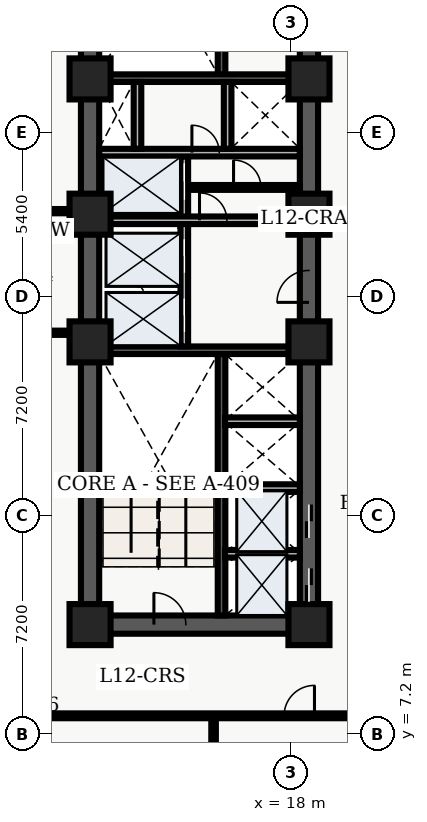
"""IFC4 building model, lengths in metres.
Left out: names, types, materials, properties, quantities, classifications, styles, units other than length and angle.
Written with IfcOpenShell. Run it as: python <this file> out.ifc"""

import sys

from ifc_helpers import new_model, entity, si_unit, converted_unit, direction, frame, origin_with_axes, origin_2d_with_axis, place, context, subcontext, project, spatial, polyline, rectangle, outline, extrude, element, fill, save


model = new_model("IFC4")
c1 = context("Model", 3, precision=1e-05, world=origin_with_axes(), true_north=direction((0.0, 1.0)))
c2 = subcontext(c1, "Body", "Model", "MODEL_VIEW")
j1 = project(units=[si_unit("LENGTHUNIT", "METRE"), converted_unit("PLANEANGLEUNIT", "DEGREE", entity("IfcPlaneAngleMeasure", 0.017), si_unit("PLANEANGLEUNIT", "RADIAN"), dimensions=[0, 0, 0, 0, 0, 0, 0])], contexts=[c1])
p1 = place(None, origin_with_axes())
s1 = spatial("IfcSite", under=j1, at=p1, CompositionType="ELEMENT")
p2 = place(p1, origin_with_axes())
s2 = spatial("IfcBuilding", under=s1, at=p2, CompositionType="ELEMENT")
p3 = place(p2, frame((0.0, 0.0, 52.2), z_axis=(0.0, 0.0, 1.0), x_axis=(1.0, 0.0, 0.0)))
s3 = spatial("IfcBuildingStorey", under=s2, at=p3, CompositionType="ELEMENT", Elevation=52.2)
p4 = place(p3, frame((11.4, 10.8, 0.0), z_axis=(0.0, 0.0, 1.0), x_axis=(0.0, 1.0, 0.0)))
e1 = element("IfcWall", 1, at=p4, inside=s3, PredefinedType="SHEAR", context=c2, shape_type="SweptSolid", body=[
    extrude(outline(polyline([(0.0, -0.3), (27.0, -0.3), (27.0, 0.3), (0.0, 0.3), (0.0, -0.3)])), origin_with_axes(), (0.0, 0.0, 1.0), 3.66),
])
p5 = place(p3, frame((11.4, 10.8, 0.0), z_axis=(0.0, 0.0, 1.0), x_axis=(1.0, 0.0, 0.0)))
e2 = element("IfcWall", 2, at=p5, inside=s3, PredefinedType="SHEAR", context=c2, shape_type="SweptSolid", body=[
    extrude(outline(polyline([(0.0, -0.3), (7.2, -0.3), (7.2, 0.3), (0.0, 0.3), (0.0, -0.3)])), origin_with_axes(), (0.0, 0.0, 1.0), 3.66),
])
p6 = place(p5, frame((2.625, 0.0, 0.0), z_axis=(0.0, 0.0, 1.0), x_axis=(1.0, 0.0, 0.0)))
e3 = element("IfcOpeningElement", 3, at=p6, cuts=e2, PredefinedType="OPENING", context=c2, shape_type="SweptSolid", body=[
    extrude(rectangle(XDim=1.05, YDim=0.62, at=origin_2d_with_axis()), origin_with_axes(), (0.0, 0.0, 1.0), 2.15),
])
p7 = place(p3, frame((18.6, 10.8, 0.0), z_axis=(0.0, 0.0, 1.0), x_axis=(0.0, 1.0, 0.0)))
e4 = element("IfcWall", 4, at=p7, inside=s3, PredefinedType="SHEAR", context=c2, shape_type="SweptSolid", body=[
    extrude(outline(polyline([(0.0, -0.3), (13.5, -0.3), (13.5, 0.3), (0.0, 0.3), (0.0, -0.3)])), origin_with_axes(), (0.0, 0.0, 1.0), 3.66),
])
p8 = place(p7, frame((1.3, 0.0, 0.0), z_axis=(0.0, 0.0, 1.0), x_axis=(1.0, 0.0, 0.0)))
e5 = element("IfcOpeningElement", 5, at=p8, cuts=e4, PredefinedType="OPENING", context=c2, shape_type="SweptSolid", body=[
    extrude(rectangle(XDim=1.1, YDim=0.62, at=origin_2d_with_axis()), origin_with_axes(), (0.0, 0.0, 1.0), 2.15),
])
p9 = place(p7, frame((3.4, 0.0, 0.0), z_axis=(0.0, 0.0, 1.0), x_axis=(1.0, 0.0, 0.0)))
e6 = element("IfcOpeningElement", 6, at=p9, cuts=e4, PredefinedType="OPENING", context=c2, shape_type="SweptSolid", body=[
    extrude(rectangle(XDim=1.1, YDim=0.62, at=origin_2d_with_axis()), origin_with_axes(), (0.0, 0.0, 1.0), 2.15),
])
p10 = place(p7, frame((11.125, 0.0, 0.0), z_axis=(0.0, 0.0, 1.0), x_axis=(1.0, 0.0, 0.0)))
e7 = element("IfcOpeningElement", 7, at=p10, cuts=e4, PredefinedType="OPENING", context=c2, shape_type="SweptSolid", body=[
    extrude(rectangle(XDim=1.05, YDim=0.62, at=origin_2d_with_axis()), origin_with_axes(), (0.0, 0.0, 1.0), 2.15),
])
p11 = place(p3, frame((18.6, 24.3, 0.0), z_axis=(0.0, 0.0, 1.0), x_axis=(0.0, 1.0, 0.0)))
e8 = element("IfcWall", 8, at=p11, inside=s3, PredefinedType="SHEAR", context=c2, shape_type="SweptSolid", body=[
    extrude(outline(polyline([(0.0, -0.3), (13.5, -0.3), (13.5, 0.3), (0.0, 0.3), (0.0, -0.3)])), origin_with_axes(), (0.0, 0.0, 1.0), 3.66),
])
p12 = place(p11, frame((6.725, 0.0, 0.0), z_axis=(0.0, 0.0, 1.0), x_axis=(1.0, 0.0, 0.0)))
e9 = element("IfcOpeningElement", 9, at=p12, cuts=e8, PredefinedType="OPENING", context=c2, shape_type="SweptSolid", body=[
    extrude(rectangle(XDim=1.05, YDim=0.62, at=origin_2d_with_axis()), origin_with_axes(), (0.0, 0.0, 1.0), 2.15),
])
p13 = place(p3, frame((15.725, 11.1, 0.0), z_axis=(0.0, 0.0, 1.0), x_axis=(0.0, 1.0, 0.0)))
e10 = element("IfcWall", 10, at=p13, inside=s3, PredefinedType="SHEAR", context=c2, shape_type="SweptSolid", body=[
    extrude(outline(polyline([(0.0, -0.125), (8.6, -0.125), (8.6, 0.125), (0.0, 0.125), (0.0, -0.125)])), origin_with_axes(), (0.0, 0.0, 1.0), 3.66),
])
p14 = place(p3, frame((11.7, 19.825, 0.0), z_axis=(0.0, 0.0, 1.0), x_axis=(1.0, 0.0, 0.0)))
e11 = element("IfcWall", 11, at=p14, inside=s3, PredefinedType="SHEAR", context=c2, shape_type="SweptSolid", body=[
    extrude(outline(polyline([(0.0, -0.125), (6.6, -0.125), (6.6, 0.125), (0.0, 0.125), (0.0, -0.125)])), origin_with_axes(), (0.0, 0.0, 1.0), 3.66),
])
p15 = place(p3, frame((15.725, 28.9, 0.0), z_axis=(0.0, 0.0, 1.0), x_axis=(0.0, 1.0, 0.0)))
e12 = element("IfcWall", 12, at=p15, inside=s3, PredefinedType="SHEAR", context=c2, shape_type="SweptSolid", body=[
    extrude(outline(polyline([(0.0, -0.125), (8.6, -0.125), (8.6, 0.125), (0.0, 0.125), (0.0, -0.125)])), origin_with_axes(), (0.0, 0.0, 1.0), 3.66),
])
p16 = place(p3, frame((11.7, 28.775, 0.0), z_axis=(0.0, 0.0, 1.0), x_axis=(1.0, 0.0, 0.0)))
e13 = element("IfcWall", 13, at=p16, inside=s3, PredefinedType="SHEAR", context=c2, shape_type="SweptSolid", body=[
    extrude(outline(polyline([(0.0, -0.125), (6.6, -0.125), (6.6, 0.125), (0.0, 0.125), (0.0, -0.125)])), origin_with_axes(), (0.0, 0.0, 1.0), 3.66),
])
p17 = place(p3, frame((14.5, 19.95, 0.0), z_axis=(0.0, 0.0, 1.0), x_axis=(0.0, 1.0, 0.0)))
e14 = element("IfcWall", 14, at=p17, inside=s3, PredefinedType="SOLIDWALL", context=c2, shape_type="SweptSolid", body=[
    extrude(outline(polyline([(0.0, -0.125), (6.25, -0.125), (6.25, 0.125), (0.0, 0.125), (0.0, -0.125)])), origin_with_axes(), (0.0, 0.0, 1.0), 2.7),
])
p18 = place(p17, frame((1.025, 0.0, 0.0), z_axis=(0.0, 0.0, 1.0), x_axis=(1.0, 0.0, 0.0)))
e15 = element("IfcOpeningElement", 15, at=p18, cuts=e14, PredefinedType="OPENING", context=c2, shape_type="SweptSolid", body=[
    extrude(rectangle(XDim=1.1, YDim=0.27, at=origin_2d_with_axis()), origin_with_axes(), (0.0, 0.0, 1.0), 2.15),
])
p19 = place(p17, frame((2.975, 0.0, 0.0), z_axis=(0.0, 0.0, 1.0), x_axis=(1.0, 0.0, 0.0)))
e16 = element("IfcOpeningElement", 16, at=p19, cuts=e14, PredefinedType="OPENING", context=c2, shape_type="SweptSolid", body=[
    extrude(rectangle(XDim=1.1, YDim=0.27, at=origin_2d_with_axis()), origin_with_axes(), (0.0, 0.0, 1.0), 2.15),
])
p20 = place(p17, frame((5.425, 0.0, 0.0), z_axis=(0.0, 0.0, 1.0), x_axis=(1.0, 0.0, 0.0)))
e17 = element("IfcOpeningElement", 17, at=p20, cuts=e14, PredefinedType="OPENING", context=c2, shape_type="SweptSolid", body=[
    extrude(rectangle(XDim=1.2, YDim=0.27, at=origin_2d_with_axis()), origin_with_axes(), (0.0, 0.0, 1.0), 2.15),
])
p21 = place(p3, frame((11.7, 24.1, 0.0), z_axis=(0.0, 0.0, 1.0), x_axis=(1.0, 0.0, 0.0)))
e18 = element("IfcWall", 18, at=p21, inside=s3, PredefinedType="SOLIDWALL", context=c2, shape_type="SweptSolid", body=[
    extrude(outline(polyline([(0.0, -0.125), (6.6, -0.125), (6.6, 0.125), (0.0, 0.125), (0.0, -0.125)])), origin_with_axes(), (0.0, 0.0, 1.0), 2.7),
])
p22 = place(p21, frame((3.75, 0.0, 0.0), z_axis=(0.0, 0.0, 1.0), x_axis=(1.0, 0.0, 0.0)))
e19 = element("IfcOpeningElement", 19, at=p22, cuts=e18, PredefinedType="OPENING", context=c2, shape_type="SweptSolid", body=[
    extrude(rectangle(XDim=0.9, YDim=0.27, at=origin_2d_with_axis()), origin_with_axes(), (0.0, 0.0, 1.0), 2.15),
])
p23 = place(p3, frame((11.7, 26.325, 0.0), z_axis=(0.0, 0.0, 1.0), x_axis=(1.0, 0.0, 0.0)))
e20 = element("IfcWall", 20, at=p23, inside=s3, PredefinedType="SOLIDWALL", context=c2, shape_type="SweptSolid", body=[
    extrude(outline(polyline([(0.0, -0.125), (6.6, -0.125), (6.6, 0.125), (0.0, 0.125), (0.0, -0.125)])), origin_with_axes(), (0.0, 0.0, 1.0), 2.7),
])
p24 = place(p23, frame((3.5, 0.0, 0.0), z_axis=(0.0, 0.0, 1.0), x_axis=(1.0, 0.0, 0.0)))
e21 = element("IfcOpeningElement", 21, at=p24, cuts=e20, PredefinedType="OPENING", context=c2, shape_type="SweptSolid", body=[
    extrude(rectangle(XDim=0.9, YDim=0.27, at=origin_2d_with_axis()), origin_with_axes(), (0.0, 0.0, 1.0), 2.15),
])
for number, where, z_axis, x_axis in (
    (22, (12.96, 26.45, 0.0), (0.0, 0.0, 1.0), (0.0, 1.0, 0.0)),
    (23, (15.925, 26.45, 0.0), (0.0, 0.0, 1.0), (0.0, 1.0, 0.0)),
):
    element("IfcWall", number, at=place(p3, frame(where, z_axis=z_axis, x_axis=x_axis)), inside=s3, PredefinedType="SOLIDWALL", context=c2, shape_type="SweptSolid", body=[
        extrude(outline(polyline([(0.0, -0.125), (2.2, -0.125), (2.2, 0.125), (0.0, 0.125), (0.0, -0.125)])), origin_with_axes(), (0.0, 0.0, 1.0), 2.7),
    ])
for number, where, z_axis, x_axis in (
    (24, (11.4, 10.8, 0.0), (0.0, 0.0, 1.0), (1.0, 0.0, 0.0)),
    (25, (11.4, 20.1, 0.0), (0.0, 0.0, 1.0), (1.0, 0.0, 0.0)),
    (26, (11.4, 24.3, 0.0), (0.0, 0.0, 1.0), (1.0, 0.0, 0.0)),
    (27, (11.4, 28.75, 0.0), (0.0, 0.0, 1.0), (1.0, 0.0, 0.0)),
    (28, (18.6, 10.8, 0.0), (0.0, 0.0, 1.0), (1.0, 0.0, 0.0)),
    (29, (18.6, 20.1, 0.0), (0.0, 0.0, 1.0), (1.0, 0.0, 0.0)),
    (30, (18.6, 24.3, 0.0), (0.0, 0.0, 1.0), (1.0, 0.0, 0.0)),
    (31, (18.6, 28.75, 0.0), (0.0, 0.0, 1.0), (1.0, 0.0, 0.0)),
):
    element("IfcColumn", number, at=place(p3, frame(where, z_axis=z_axis, x_axis=x_axis)), inside=s3, PredefinedType="COLUMN", context=c2, shape_type="SweptSolid", body=[
        extrude(rectangle(XDim=1.35, YDim=1.35, at=origin_2d_with_axis()), origin_with_axes(), (0.0, 0.0, 1.0), 3.9),
    ])
p25 = place(p3, frame((14.62, 25.18, 0.0), z_axis=(0.0, 0.0, 1.0), x_axis=(1.0, 0.0, 0.0)))
e32 = element("IfcWall", 32, at=p25, inside=s3, PredefinedType="PARTITIONING", context=c2, shape_type="SweptSolid", body=[
    extrude(outline(polyline([(0.0, -0.08), (3.68, -0.08), (3.68, 0.08), (0.0, 0.08), (0.0, -0.08)])), origin_with_axes(), (0.0, 0.0, 1.0), 2.7),
])
p26 = place(p25, frame((1.95, 0.0, 0.0), z_axis=(0.0, 0.0, 1.0), x_axis=(1.0, 0.0, 0.0)))
e33 = element("IfcOpeningElement", 33, at=p26, cuts=e32, PredefinedType="OPENING", context=c2, shape_type="SweptSolid", body=[
    extrude(rectangle(XDim=0.9, YDim=0.18, at=origin_2d_with_axis()), origin_with_axes(), (0.0, 0.0, 1.0), 2.15),
])
for number, where, z_axis, x_axis in (
    (34, (15.84, 13.13, 0.0), (0.0, 0.0, 1.0), (1.0, 0.0, 0.0)),
    (35, (15.84, 15.29, 0.0), (0.0, 0.0, 1.0), (1.0, 0.0, 0.0)),
    (36, (15.84, 17.49, 0.0), (0.0, 0.0, 1.0), (1.0, 0.0, 0.0)),
):
    element("IfcWall", number, at=place(p3, frame(where, z_axis=z_axis, x_axis=x_axis)), inside=s3, PredefinedType="SOLIDWALL", context=c2, shape_type="SweptSolid", body=[
        extrude(outline(polyline([(0.0, -0.125), (2.46, -0.125), (2.46, 0.125), (0.0, 0.125), (0.0, -0.125)])), origin_with_axes(), (0.0, 0.0, 1.0), 2.7),
    ])
for number, where, z_axis, x_axis in (
    (37, (9.52, 20.4, 0.0), (0.0, 0.0, 1.0), (1.0, 0.0, 0.0)),
    (38, (9.52, 24.4, 0.0), (0.0, 0.0, 1.0), (1.0, 0.0, 0.0)),
):
    element("IfcWall", number, at=place(p3, frame(where, z_axis=z_axis, x_axis=x_axis)), inside=s3, PredefinedType="PARTITIONING", context=c2, shape_type="SweptSolid", body=[
        extrude(outline(polyline([(0.0, -0.07), (1.58, -0.07), (1.58, 0.07), (0.0, 0.07), (0.0, -0.07)])), origin_with_axes(), (0.0, 0.0, 1.0), 2.7),
    ])
p27 = place(p3, frame((2.6, 7.8, 0.0), z_axis=(0.0, 0.0, 1.0), x_axis=(1.0, 0.0, 0.0)))
e39 = element("IfcWall", 39, at=p27, inside=s3, PredefinedType="PARTITIONING", context=c2, shape_type="SweptSolid", body=[
    extrude(outline(polyline([(0.0, -0.08), (18.55, -0.08), (18.55, 0.08), (0.0, 0.08), (0.0, -0.08)])), origin_with_axes(), (0.0, 0.0, 1.0), 2.7),
])
p28 = place(p27, frame((6.426, 0.0, 0.0), z_axis=(0.0, 0.0, 1.0), x_axis=(1.0, 0.0, 0.0)))
e40 = element("IfcOpeningElement", 40, at=p28, cuts=e39, PredefinedType="OPENING", context=c2, shape_type="SweptSolid", body=[
    extrude(rectangle(XDim=1.2, YDim=0.18, at=origin_2d_with_axis()), origin_with_axes(), (0.0, 0.0, 1.0), 2.2),
])
p29 = place(p27, frame((15.681, 0.0, 0.0), z_axis=(0.0, 0.0, 1.0), x_axis=(1.0, 0.0, 0.0)))
e41 = element("IfcOpeningElement", 41, at=p29, cuts=e39, PredefinedType="OPENING", context=c2, shape_type="SweptSolid", body=[
    extrude(rectangle(XDim=1.0, YDim=0.18, at=origin_2d_with_axis()), origin_with_axes(), (0.0, 0.0, 1.0), 2.15),
])
p30 = place(p3, frame((15.463, 0.36, 0.0), z_axis=(0.0, 0.0, 1.0), x_axis=(0.0, 1.0, 0.0)))
e42 = element("IfcWall", 42, at=p30, inside=s3, PredefinedType="PARTITIONING", context=c2, shape_type="SweptSolid", body=[
    extrude(outline(polyline([(0.0, -0.075), (7.34, -0.075), (7.34, 0.075), (0.0, 0.075), (0.0, -0.075)])), origin_with_axes(), (0.0, 0.0, 1.0), 2.7),
])
p31 = place(p7, frame((1.3, 0.0, 0.0), z_axis=(0.0, 0.0, 1.0), x_axis=(1.0, 0.0, 0.0)))
e43 = element("IfcDoor", 43, at=p31, inside=s3, OperationType="SLIDING_TO_LEFT", PredefinedType="DOOR", context=c2, shape_type="SweptSolid", body=[
    extrude(rectangle(XDim=1.1, YDim=0.09, at=origin_2d_with_axis()), origin_with_axes(), (0.0, 0.0, 1.0), 2.15),
])
fill(e5, e43)
p32 = place(p7, frame((3.4, 0.0, 0.0), z_axis=(0.0, 0.0, 1.0), x_axis=(1.0, 0.0, 0.0)))
e44 = element("IfcDoor", 44, at=p32, inside=s3, OperationType="SLIDING_TO_RIGHT", PredefinedType="DOOR", context=c2, shape_type="SweptSolid", body=[
    extrude(rectangle(XDim=1.1, YDim=0.09, at=origin_2d_with_axis()), origin_with_axes(), (0.0, 0.0, 1.0), 2.15),
])
fill(e6, e44)
p33 = place(p17, frame((1.025, 0.0, 0.0), z_axis=(0.0, 0.0, 1.0), x_axis=(1.0, 0.0, 0.0)))
e45 = element("IfcDoor", 45, at=p33, inside=s3, OperationType="SLIDING_TO_LEFT", PredefinedType="DOOR", context=c2, shape_type="SweptSolid", body=[
    extrude(rectangle(XDim=1.1, YDim=0.09, at=origin_2d_with_axis()), origin_with_axes(), (0.0, 0.0, 1.0), 2.15),
])
fill(e15, e45)
p34 = place(p17, frame((2.975, 0.0, 0.0), z_axis=(0.0, 0.0, 1.0), x_axis=(1.0, 0.0, 0.0)))
e46 = element("IfcDoor", 46, at=p34, inside=s3, OperationType="SLIDING_TO_RIGHT", PredefinedType="DOOR", context=c2, shape_type="SweptSolid", body=[
    extrude(rectangle(XDim=1.1, YDim=0.09, at=origin_2d_with_axis()), origin_with_axes(), (0.0, 0.0, 1.0), 2.15),
])
fill(e16, e46)
p35 = place(p17, frame((5.425, 0.0, 0.0), z_axis=(0.0, 0.0, 1.0), x_axis=(1.0, 0.0, 0.0)))
e47 = element("IfcDoor", 47, at=p35, inside=s3, OperationType="DOUBLE_DOOR_SLIDING", PredefinedType="DOOR", context=c2, shape_type="SweptSolid", body=[
    extrude(rectangle(XDim=1.2, YDim=0.09, at=origin_2d_with_axis()), origin_with_axes(), (0.0, 0.0, 1.0), 2.15),
])
fill(e17, e47)
p36 = place(p5, frame((2.625, 0.0, 0.0), z_axis=(0.0, 0.0, 1.0), x_axis=(1.0, 0.0, 0.0)))
e48 = element("IfcDoor", 48, at=p36, inside=s3, OperationType="SINGLE_SWING_LEFT", PredefinedType="DOOR", context=c2, shape_type="SweptSolid", body=[
    extrude(rectangle(XDim=1.05, YDim=0.09, at=origin_2d_with_axis()), origin_with_axes(), (0.0, 0.0, 1.0), 2.15),
])
fill(e3, e48)
p37 = place(p7, frame((11.125, 0.0, 0.0), z_axis=(0.0, 0.0, 1.0), x_axis=(1.0, 0.0, 0.0)))
e49 = element("IfcDoor", 49, at=p37, inside=s3, OperationType="SINGLE_SWING_LEFT", PredefinedType="DOOR", context=c2, shape_type="SweptSolid", body=[
    extrude(rectangle(XDim=1.05, YDim=0.09, at=origin_2d_with_axis()), origin_with_axes(), (0.0, 0.0, 1.0), 2.15),
])
fill(e7, e49)
p38 = place(p23, frame((3.5, 0.0, 0.0), z_axis=(0.0, 0.0, 1.0), x_axis=(1.0, 0.0, 0.0)))
e50 = element("IfcDoor", 50, at=p38, inside=s3, OperationType="SINGLE_SWING_LEFT", PredefinedType="DOOR", context=c2, shape_type="SweptSolid", body=[
    extrude(rectangle(XDim=0.9, YDim=0.09, at=origin_2d_with_axis()), origin_with_axes(), (0.0, 0.0, 1.0), 2.15),
])
fill(e21, e50)
p39 = place(p21, frame((3.75, 0.0, 0.0), z_axis=(0.0, 0.0, 1.0), x_axis=(1.0, 0.0, 0.0)))
e51 = element("IfcDoor", 51, at=p39, inside=s3, OperationType="SINGLE_SWING_LEFT", PredefinedType="DOOR", context=c2, shape_type="SweptSolid", body=[
    extrude(rectangle(XDim=0.9, YDim=0.09, at=origin_2d_with_axis()), origin_with_axes(), (0.0, 0.0, 1.0), 2.15),
])
fill(e19, e51)
p40 = place(p25, frame((1.95, 0.0, 0.0), z_axis=(0.0, 0.0, 1.0), x_axis=(1.0, 0.0, 0.0)))
e52 = element("IfcDoor", 52, at=p40, inside=s3, OperationType="SINGLE_SWING_LEFT", PredefinedType="DOOR", context=c2, shape_type="SweptSolid", body=[
    extrude(rectangle(XDim=0.9, YDim=0.09, at=origin_2d_with_axis()), origin_with_axes(), (0.0, 0.0, 1.0), 2.15),
])
fill(e33, e52)
p41 = place(p27, frame((15.681, 0.0, 0.0), z_axis=(0.0, 0.0, 1.0), x_axis=(1.0, 0.0, 0.0)))
e53 = element("IfcDoor", 53, at=p41, inside=s3, OperationType="SINGLE_SWING_RIGHT", PredefinedType="DOOR", context=c2, shape_type="SweptSolid", body=[
    extrude(rectangle(XDim=1.0, YDim=0.09, at=origin_2d_with_axis()), origin_with_axes(), (0.0, 0.0, 1.0), 2.15),
])
fill(e41, e53)
save(model, sys.argv[1])
